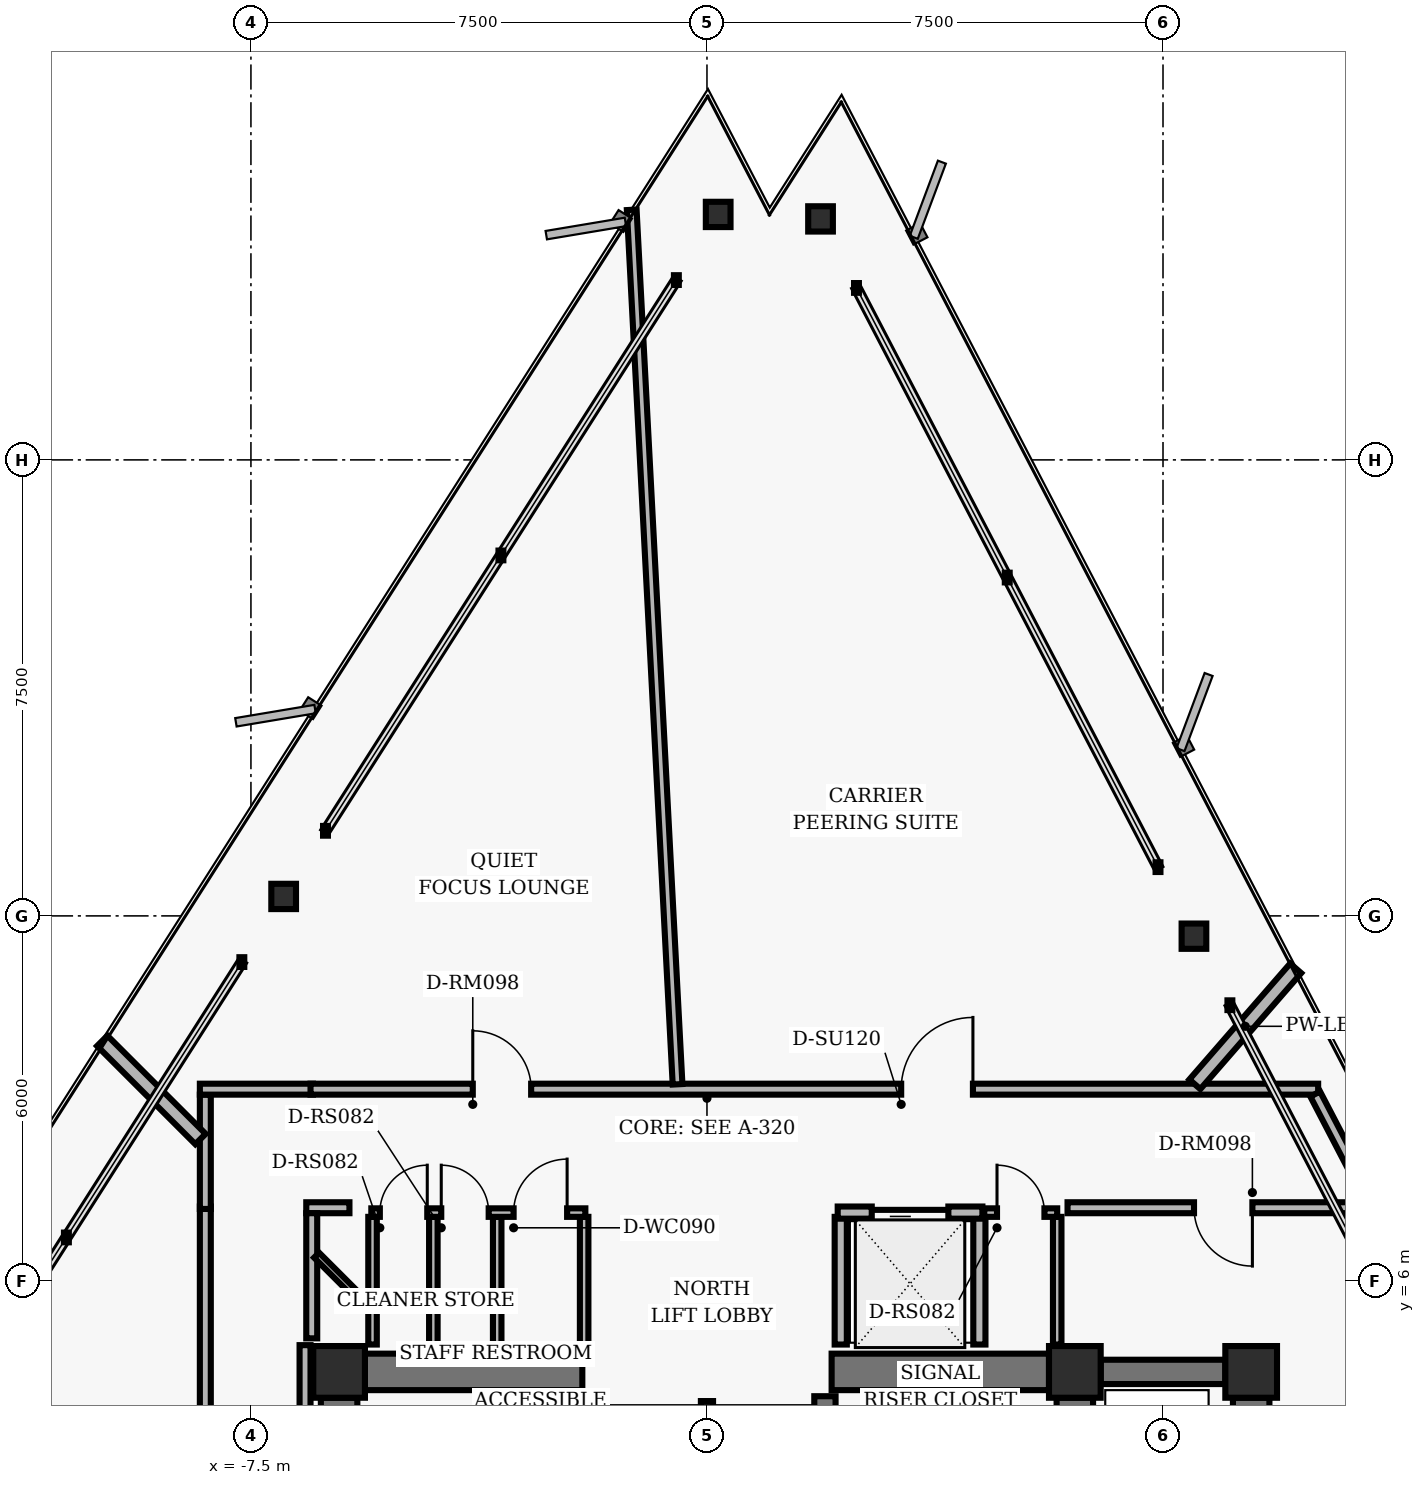
"""IFC4 building model, lengths in metres.
Left out: names, types, materials, properties, quantities, classifications, styles, units other than length and angle.
Written with IfcOpenShell. Run it as: python <this file> out.ifc"""

import sys

from ifc_helpers import new_model, si_unit, direction, frame, frame_2d, origin, origin_2d, place, context, subcontext, project, spatial, rectangle, hollow_rectangle, i_section, extrude, element, fill, save


model = new_model("IFC4")
c1 = context("Model", 3, precision=1e-05, world=origin(), true_north=direction((0.0, 1.0)))
c2 = subcontext(c1, "Body", "Model", "MODEL_VIEW")
j1 = project(units=[si_unit("LENGTHUNIT", "METRE"), si_unit("PLANEANGLEUNIT", "RADIAN")], contexts=[c1])
p1 = place(None, origin())
s1 = spatial("IfcSite", under=j1, at=p1, CompositionType="ELEMENT")
p2 = place(p1, origin())
s2 = spatial("IfcBuilding", under=s1, at=p2, CompositionType="ELEMENT")
p3 = place(p2, frame((0.0, 0.0, 128.96)))
s3 = spatial("IfcBuildingStorey", under=s2, at=p3, CompositionType="ELEMENT", Elevation=128.96)
for number, where, z_axis, x_axis in (
    (1, (-6.05, 4.5, 0.0), (0.0, 0.0, 1.0), (1.0, 0.0, 0.0)),
    (2, (6.05, 4.5, 0.0), (0.0, 0.0, 1.0), (1.0, 0.0, 0.0)),
    (3, (8.95, 4.5, 0.0), (0.0, 0.0, 1.0), (1.0, 0.0, 0.0)),
):
    element("IfcColumn", number, at=place(p3, frame(where, z_axis=z_axis, x_axis=x_axis)), inside=s3, PredefinedType="COLUMN", context=c2, shape_type="SweptSolid", body=[
        extrude(hollow_rectangle(XDim=0.85, YDim=0.85, WallThickness=0.055, InnerFilletRadius=0.02, OuterFilletRadius=0.04, at=origin_2d()), origin(), (0.0, 0.0, 1.0), 3.04),
    ])
for number, where, z_axis, x_axis in (
    (4, (-6.05, 0.425, 0.0), (0.0, 0.0, 1.0), (0.0, 1.0, 0.0)),
    (5, (6.05, 0.425, 0.0), (0.0, 0.0, 1.0), (0.0, 1.0, 0.0)),
):
    element("IfcWall", number, at=place(p3, frame(where, z_axis=z_axis, x_axis=x_axis)), inside=s3, PredefinedType="SHEAR", context=c2, shape_type="SweptSolid", body=[
        extrude(rectangle(XDim=3.65, YDim=0.6, at=frame_2d((1.825, 0.0))), origin(), (0.0, 0.0, 1.0), 2.788),
    ])
for number, where, z_axis, x_axis in (
    (6, (-1.94, -4.1, 0.0), (0.0, 0.0, 1.0), (0.0, 1.0, 0.0)),
    (7, (1.94, -4.1, 0.0), (0.0, 0.0, 1.0), (0.0, 1.0, 0.0)),
):
    element("IfcWall", number, at=place(p3, frame(where, z_axis=z_axis, x_axis=x_axis)), inside=s3, PredefinedType="SHEAR", context=c2, shape_type="SweptSolid", body=[
        extrude(rectangle(XDim=8.2, YDim=0.35, at=frame_2d((4.1, 0.0))), origin(), (0.0, 0.0, 1.0), 2.788),
    ])
for number, where, z_axis, x_axis in (
    (8, (-5.625, 4.5, 0.0), (0.0, 0.0, 1.0), (1.0, 0.0, 0.0)),
    (9, (2.05, 4.5, 0.0), (0.0, 0.0, 1.0), (1.0, 0.0, 0.0)),
):
    element("IfcWall", number, at=place(p3, frame(where, z_axis=z_axis, x_axis=x_axis)), inside=s3, PredefinedType="SHEAR", context=c2, shape_type="SweptSolid", body=[
        extrude(rectangle(XDim=3.575, YDim=0.6, at=frame_2d((1.788, 0.0))), origin(), (0.0, 0.0, 1.0), 2.788),
    ])
p4 = place(p3, frame((8.95, -3.875, 0.0), z_axis=(0.0, 0.0, 1.0), x_axis=(0.0, 1.0, 0.0)))
e10 = element("IfcWall", 10, at=p4, inside=s3, PredefinedType="SHEAR", context=c2, shape_type="SweptSolid", body=[
    extrude(rectangle(XDim=7.95, YDim=0.6, at=frame_2d((3.975, 0.0))), origin(), (0.0, 0.0, 1.0), 2.788),
])
p5 = place(p4, frame((0.55, 0.0, 0.0)))
e11 = element("IfcOpeningElement", 11, at=p5, cuts=e10, PredefinedType="OPENING", context=c2, shape_type="SweptSolid", body=[
    extrude(rectangle(XDim=1.06, YDim=2.04, at=frame_2d((0.53, 1.02))), frame((0.0, 0.31, 0.0), z_axis=(0.0, -1.0, 0.0), x_axis=(1.0, 0.0, 0.0)), (0.0, 0.0, 1.0), 0.62),
])
p6 = place(p4, frame((3.445, 0.0, 0.0)))
e12 = element("IfcOpeningElement", 12, at=p6, cuts=e10, PredefinedType="OPENING", context=c2, shape_type="SweptSolid", body=[
    extrude(rectangle(XDim=1.06, YDim=2.04, at=frame_2d((0.53, 1.02))), frame((0.0, 0.31, 0.0), z_axis=(0.0, -1.0, 0.0), x_axis=(1.0, 0.0, 0.0)), (0.0, 0.0, 1.0), 0.62),
])
p7 = place(p4, frame((6.33, 0.0, 0.0)))
e13 = element("IfcOpeningElement", 13, at=p7, cuts=e10, PredefinedType="OPENING", context=c2, shape_type="SweptSolid", body=[
    extrude(rectangle(XDim=1.06, YDim=2.04, at=frame_2d((0.53, 1.02))), frame((0.0, 0.31, 0.0), z_axis=(0.0, -1.0, 0.0), x_axis=(1.0, 0.0, 0.0)), (0.0, 0.0, 1.0), 0.62),
])
p8 = place(p3, frame((6.475, 4.5, 0.0), z_axis=(0.0, 0.0, 1.0), x_axis=(1.0, 0.0, 0.0)))
e14 = element("IfcWall", 14, at=p8, inside=s3, PredefinedType="SHEAR", context=c2, shape_type="SweptSolid", body=[
    extrude(rectangle(XDim=2.05, YDim=0.4, at=frame_2d((1.025, 0.0))), origin(), (0.0, 0.0, 1.0), 2.788),
])
for number, where, z_axis, x_axis in (
    (15, (8.009, 11.666, 0.0), (0.0, 0.0, 1.0), (1.0, 0.0, 0.0)),
    (16, (1.868, 23.463, 0.0), (0.0, 0.0, 1.0), (1.0, 0.0, 0.0)),
    (17, (0.184, 23.537, 0.0), (0.0, 0.0, 1.0), (1.0, 0.0, 0.0)),
    (18, (-6.962, 12.32, 0.0), (0.0, 0.0, 1.0), (1.0, 0.0, 0.0)),
):
    element("IfcColumn", number, at=place(p3, frame(where, z_axis=z_axis, x_axis=x_axis)), inside=s3, PredefinedType="COLUMN", context=c2, shape_type="SweptSolid", body=[
        extrude(i_section(OverallWidth=0.406, OverallDepth=0.416, WebThickness=0.03, FlangeThickness=0.048, FilletRadius=0.02, at=origin_2d()), origin(), (0.0, 0.0, 1.0), 3.04),
    ])
p9 = place(p3, frame((0.0, 1.25, 0.0), z_axis=(0.0, 0.0, 1.0), x_axis=(0.0, 1.0, 0.0)))
e19 = element("IfcWall", 19, at=p9, inside=s3, PredefinedType="PARTITIONING", context=c2, shape_type="SweptSolid", body=[
    extrude(rectangle(XDim=2.77, YDim=0.2, at=frame_2d((1.385, 0.0))), origin(), (0.0, 0.0, 1.0), 2.763),
])
for number, where, z_axis, x_axis in (
    (20, (2.2, 4.95, 0.0), (0.0, 0.0, 1.0), (0.0, 1.0, 0.0)),
    (21, (4.48, 4.95, 0.0), (0.0, 0.0, 1.0), (0.0, 1.0, 0.0)),
):
    element("IfcWall", number, at=place(p3, frame(where, z_axis=z_axis, x_axis=x_axis)), inside=s3, PredefinedType="PARTITIONING", context=c2, shape_type="SweptSolid", body=[
        extrude(rectangle(XDim=2.1, YDim=0.2, at=frame_2d((1.05, 0.0))), origin(), (0.0, 0.0, 1.0), 2.763),
    ])
p10 = place(p3, frame((2.15, 7.12, 0.0), z_axis=(0.0, 0.0, 1.0), x_axis=(1.0, 0.0, 0.0)))
e22 = element("IfcWall", 22, at=p10, inside=s3, PredefinedType="PARTITIONING", context=c2, shape_type="SweptSolid", body=[
    extrude(rectangle(XDim=2.38, YDim=0.2, at=frame_2d((1.19, 0.0))), origin(), (0.0, 0.0, 1.0), 2.763),
])
p11 = place(p10, frame((0.56, 0.0, 0.0)))
e23 = element("IfcOpeningElement", 23, at=p11, cuts=e22, PredefinedType="OPENING", context=c2, shape_type="SweptSolid", body=[
    extrude(rectangle(XDim=1.26, YDim=2.06, at=frame_2d((0.63, 1.03))), frame((0.0, 0.11, 0.0), z_axis=(0.0, -1.0, 0.0), x_axis=(1.0, 0.0, 0.0)), (0.0, 0.0, 1.0), 0.22),
])
for number, where, z_axis, x_axis in (
    (24, (-5.5, 4.95, 0.0), (0.0, 0.0, 1.0), (0.0, 1.0, 0.0)),
    (25, (-4.5, 4.95, 0.0), (0.0, 0.0, 1.0), (0.0, 1.0, 0.0)),
    (26, (-3.45, 4.95, 0.0), (0.0, 0.0, 1.0), (0.0, 1.0, 0.0)),
    (27, (-2.02, 4.95, 0.0), (0.0, 0.0, 1.0), (0.0, 1.0, 0.0)),
):
    element("IfcWall", number, at=place(p3, frame(where, z_axis=z_axis, x_axis=x_axis)), inside=s3, PredefinedType="PARTITIONING", context=c2, shape_type="SweptSolid", body=[
        extrude(rectangle(XDim=2.1, YDim=0.14, at=frame_2d((1.05, 0.0))), origin(), (0.0, 0.0, 1.0), 2.763),
    ])
p12 = place(p3, frame((-5.52, 7.12, 0.0), z_axis=(0.0, 0.0, 1.0), x_axis=(1.0, 0.0, 0.0)))
e28 = element("IfcWall", 28, at=p12, inside=s3, PredefinedType="PARTITIONING", context=c2, shape_type="SweptSolid", body=[
    extrude(rectangle(XDim=3.52, YDim=0.14, at=frame_2d((1.76, 0.0))), origin(), (0.0, 0.0, 1.0), 2.33),
])
p13 = place(p12, frame((0.14, 0.0, 0.0)))
e29 = element("IfcOpeningElement", 29, at=p13, cuts=e28, PredefinedType="OPENING", context=c2, shape_type="SweptSolid", body=[
    extrude(rectangle(XDim=0.78, YDim=2.01, at=frame_2d((0.39, 1.005))), frame((0.0, 0.08, 0.0), z_axis=(0.0, -1.0, 0.0), x_axis=(1.0, 0.0, 0.0)), (0.0, 0.0, 1.0), 0.16),
])
p14 = place(p12, frame((1.15, 0.0, 0.0)))
e30 = element("IfcOpeningElement", 30, at=p14, cuts=e28, PredefinedType="OPENING", context=c2, shape_type="SweptSolid", body=[
    extrude(rectangle(XDim=0.78, YDim=2.01, at=frame_2d((0.39, 1.005))), frame((0.0, 0.08, 0.0), z_axis=(0.0, -1.0, 0.0), x_axis=(1.0, 0.0, 0.0)), (0.0, 0.0, 1.0), 0.16),
])
p15 = place(p12, frame((2.34, 0.0, 0.0)))
e31 = element("IfcOpeningElement", 31, at=p15, cuts=e28, PredefinedType="OPENING", context=c2, shape_type="SweptSolid", body=[
    extrude(rectangle(XDim=0.88, YDim=2.02, at=frame_2d((0.44, 1.01))), frame((0.0, 0.08, 0.0), z_axis=(0.0, -1.0, 0.0), x_axis=(1.0, 0.0, 0.0)), (0.0, 0.0, 1.0), 0.16),
])
p16 = place(p3, frame((5.76, 4.95, 0.0), z_axis=(0.0, 0.0, 1.0), x_axis=(0.0, 1.0, 0.0)))
e32 = element("IfcWall", 32, at=p16, inside=s3, PredefinedType="PARTITIONING", context=c2, shape_type="SweptSolid", body=[
    extrude(rectangle(XDim=2.1, YDim=0.14, at=frame_2d((1.05, 0.0))), origin(), (0.0, 0.0, 1.0), 2.763),
])
p17 = place(p3, frame((4.56, 7.12, 0.0), z_axis=(0.0, 0.0, 1.0), x_axis=(1.0, 0.0, 0.0)))
e33 = element("IfcWall", 33, at=p17, inside=s3, PredefinedType="PARTITIONING", context=c2, shape_type="SweptSolid", body=[
    extrude(rectangle(XDim=1.2, YDim=0.14, at=frame_2d((0.6, 0.0))), origin(), (0.0, 0.0, 1.0), 2.763),
])
p18 = place(p17, frame((0.21, 0.0, 0.0)))
e34 = element("IfcOpeningElement", 34, at=p18, cuts=e33, PredefinedType="OPENING", context=c2, shape_type="SweptSolid", body=[
    extrude(rectangle(XDim=0.78, YDim=2.01, at=frame_2d((0.39, 1.005))), frame((0.0, 0.08, 0.0), z_axis=(0.0, -1.0, 0.0), x_axis=(1.0, 0.0, 0.0)), (0.0, 0.0, 1.0), 0.16),
])
p19 = place(p3, frame((-8.25, -7.22, 0.0), z_axis=(0.0, 0.0, 1.0), x_axis=(0.0, 1.0, 0.0)))
e35 = element("IfcWall", 35, at=p19, inside=s3, PredefinedType="PARTITIONING", context=c2, shape_type="SweptSolid", body=[
    extrude(rectangle(XDim=14.44, YDim=0.18, at=frame_2d((7.22, 0.0))), origin(), (0.0, 0.0, 1.0), 2.763),
])
p20 = place(p19, frame((2.932, 0.0, 0.0)))
e36 = element("IfcOpeningElement", 36, at=p20, cuts=e35, PredefinedType="OPENING", context=c2, shape_type="SweptSolid", body=[
    extrude(rectangle(XDim=1.18, YDim=2.02, at=frame_2d((0.59, 1.01))), frame((0.0, 0.1, 0.0), z_axis=(0.0, -1.0, 0.0), x_axis=(1.0, 0.0, 0.0)), (0.0, 0.0, 1.0), 0.2),
])
p21 = place(p19, frame((9.892, 0.0, 0.0)))
e37 = element("IfcOpeningElement", 37, at=p21, cuts=e35, PredefinedType="OPENING", context=c2, shape_type="SweptSolid", body=[
    extrude(rectangle(XDim=1.18, YDim=2.02, at=frame_2d((0.59, 1.01))), frame((0.0, 0.1, 0.0), z_axis=(0.0, -1.0, 0.0), x_axis=(1.0, 0.0, 0.0)), (0.0, 0.0, 1.0), 0.2),
])
p22 = place(p3, frame((-8.25, 7.18, 0.0), z_axis=(0.0, 0.0, 1.0), x_axis=(0.0, 1.0, 0.0)))
e38 = element("IfcWall", 38, at=p22, inside=s3, PredefinedType="PARTITIONING", context=c2, shape_type="SweptSolid", body=[
    extrude(rectangle(XDim=1.88, YDim=0.18, at=frame_2d((0.94, 0.0))), origin(), (0.0, 0.0, 1.0), 2.763),
])
p23 = place(p3, frame((-8.34, 9.15, 0.0), z_axis=(0.0, 0.0, 1.0), x_axis=(1.0, 0.0, 0.0)))
e39 = element("IfcWall", 39, at=p23, inside=s3, PredefinedType="PARTITIONING", context=c2, shape_type="SweptSolid", body=[
    extrude(rectangle(XDim=1.86, YDim=0.18, at=frame_2d((0.93, 0.0))), origin(), (0.0, 0.0, 1.0), 2.763),
])
p24 = place(p3, frame((-6.52, 9.15, 0.0), z_axis=(0.0, 0.0, 1.0), x_axis=(1.0, 0.0, 0.0)))
e40 = element("IfcWall", 40, at=p24, inside=s3, PredefinedType="PARTITIONING", context=c2, shape_type="SweptSolid", body=[
    extrude(rectangle(XDim=16.572, YDim=0.18, at=frame_2d((8.286, 0.0))), origin(), (0.0, 0.0, 1.0), 2.33),
])
p25 = place(p24, frame((9.714, 0.0, 0.0)))
e41 = element("IfcOpeningElement", 41, at=p25, cuts=e40, PredefinedType="OPENING", context=c2, shape_type="SweptSolid", body=[
    extrude(rectangle(XDim=1.18, YDim=2.02, at=frame_2d((0.59, 1.01))), frame((0.0, 0.1, 0.0), z_axis=(0.0, -1.0, 0.0), x_axis=(1.0, 0.0, 0.0)), (0.0, 0.0, 1.0), 0.2),
])
p26 = place(p24, frame((2.668, 0.0, 0.0)))
e42 = element("IfcOpeningElement", 42, at=p26, cuts=e40, PredefinedType="OPENING", context=c2, shape_type="SweptSolid", body=[
    extrude(rectangle(XDim=0.96, YDim=2.02, at=frame_2d((0.48, 1.01))), frame((0.0, 0.1, 0.0), z_axis=(0.0, -1.0, 0.0), x_axis=(1.0, 0.0, 0.0)), (0.0, 0.0, 1.0), 0.2),
])
p27 = place(p3, frame((10.003, 9.07, 0.0), z_axis=(0.0, 0.0, 1.0), x_axis=(0.461740291408, -0.887015165198, 0.0)))
e43 = element("IfcWall", 43, at=p27, inside=s3, PredefinedType="PARTITIONING", context=c2, shape_type="SweptSolid", body=[
    extrude(rectangle(XDim=9.976, YDim=0.18, at=frame_2d((4.988, 0.0))), origin(), (0.0, 0.0, 1.0), 2.763),
])
p28 = place(p3, frame((11.05, 7.2, 0.0), z_axis=(0.0, 0.0, 1.0), x_axis=(-1.0, 0.0, 0.0)))
e44 = element("IfcWall", 44, at=p28, inside=s3, PredefinedType="PARTITIONING", context=c2, shape_type="SweptSolid", body=[
    extrude(rectangle(XDim=5.12, YDim=0.18, at=frame_2d((2.56, 0.0))), origin(), (0.0, 0.0, 1.0), 2.763),
])
p29 = place(p28, frame((2.08, 0.0, 0.0)))
e45 = element("IfcOpeningElement", 45, at=p29, cuts=e44, PredefinedType="OPENING", context=c2, shape_type="SweptSolid", body=[
    extrude(rectangle(XDim=0.96, YDim=2.02, at=frame_2d((0.48, 1.01))), frame((0.0, 0.1, 0.0), z_axis=(0.0, -1.0, 0.0), x_axis=(1.0, 0.0, 0.0)), (0.0, 0.0, 1.0), 0.2),
])
p30 = place(p3, frame((-5.88, 7.2, 0.0), z_axis=(0.0, 0.0, 1.0), x_axis=(-1.0, 0.0, 0.0)))
e46 = element("IfcWall", 46, at=p30, inside=s3, PredefinedType="PARTITIONING", context=c2, shape_type="SweptSolid", body=[
    extrude(rectangle(XDim=0.71, YDim=0.18, at=frame_2d((0.355, 0.0))), origin(), (0.0, 0.0, 1.0), 2.33),
])
p31 = place(p3, frame((-6.5, 7.11, 0.0), z_axis=(0.0, 0.0, 1.0), x_axis=(0.0, -1.0, 0.0)))
e47 = element("IfcWall", 47, at=p31, inside=s3, PredefinedType="PARTITIONING", context=c2, shape_type="SweptSolid", body=[
    extrude(rectangle(XDim=2.058, YDim=0.18, at=frame_2d((1.029, 0.0))), origin(), (0.0, 0.0, 1.0), 2.132),
])
p32 = place(p3, frame((-6.61, 4.94, 0.0), z_axis=(0.0, 0.0, 1.0), x_axis=(0.0, -1.0, 0.0)))
e48 = element("IfcWall", 48, at=p32, inside=s3, PredefinedType="PARTITIONING", context=c2, shape_type="SweptSolid", body=[
    extrude(rectangle(XDim=9.46, YDim=0.18, at=frame_2d((4.73, 0.0))), origin(), (0.0, 0.0, 1.0), 2.763),
])
p33 = place(p3, frame((8.023, 9.23, 0.0), z_axis=(0.0, 0.0, 1.0), x_axis=(0.656032852837, 0.754732334009, 0.0)))
e49 = element("IfcWall", 49, at=p33, inside=s3, PredefinedType="PARTITIONING", context=c2, shape_type="SweptSolid", body=[
    extrude(rectangle(XDim=2.528, YDim=0.24, at=frame_2d((1.264, 0.0))), origin(), (0.0, 0.0, 1.0), 2.763),
])
p34 = place(p3, frame((-0.484, 9.23, 0.0), z_axis=(0.0, 0.0, 1.0), x_axis=(-0.052344416919, 0.998629091313, 0.0)))
e50 = element("IfcWall", 50, at=p34, inside=s3, PredefinedType="PARTITIONING", context=c2, shape_type="SweptSolid", body=[
    extrude(rectangle(XDim=14.403, YDim=0.16, at=frame_2d((7.201, 0.0))), origin(), (0.0, 0.0, 1.0), 2.763),
])
p35 = place(p3, frame((-5.8, 5.8, 0.0), z_axis=(0.0, 0.0, 1.0), x_axis=(-0.707106781187, 0.707106781187, 0.0)))
e51 = element("IfcWall", 51, at=p35, inside=s3, PredefinedType="MOVABLE", context=c2, shape_type="SweptSolid", body=[
    extrude(rectangle(XDim=0.877, YDim=0.115, at=frame_2d((0.438, 0.0))), origin(), (0.0, 0.0, 1.0), 2.763),
])
p36 = place(p3, frame((-8.33, 8.33, 0.0), z_axis=(0.0, 0.0, 1.0), x_axis=(-0.707106781187, 0.707106781187, 0.0)))
e52 = element("IfcWall", 52, at=p36, inside=s3, PredefinedType="PARTITIONING", context=c2, shape_type="SweptSolid", body=[
    extrude(rectangle(XDim=2.284, YDim=0.24, at=frame_2d((1.142, 0.0))), origin(), (0.0, 0.0, 1.0), 2.763),
])
p37 = place(p11, origin())
e53 = element("IfcDoor", 53, at=p37, inside=s3, OperationType="SLIDING_TO_LEFT", PredefinedType="DOOR", context=c2, shape_type="SweptSolid", body=[
    extrude(rectangle(XDim=1.26, YDim=2.06, at=frame_2d((0.63, 1.03))), frame((0.0, 0.025, 0.0), z_axis=(0.0, -1.0, 0.0), x_axis=(1.0, 0.0, 0.0)), (0.0, 0.0, 1.0), 0.05),
])
fill(e23, e53)
p38 = place(p13, origin())
e54 = element("IfcDoor", 54, at=p38, inside=s3, OperationType="SINGLE_SWING_RIGHT", PredefinedType="DOOR", context=c2, shape_type="SweptSolid", body=[
    extrude(rectangle(XDim=0.78, YDim=2.01, at=frame_2d((0.39, 1.005))), frame((0.0, 0.025, 0.0), z_axis=(0.0, -1.0, 0.0), x_axis=(1.0, 0.0, 0.0)), (0.0, 0.0, 1.0), 0.05),
])
fill(e29, e54)
p39 = place(p14, origin())
e55 = element("IfcDoor", 55, at=p39, inside=s3, OperationType="SINGLE_SWING_LEFT", PredefinedType="DOOR", context=c2, shape_type="SweptSolid", body=[
    extrude(rectangle(XDim=0.78, YDim=2.01, at=frame_2d((0.39, 1.005))), frame((0.0, 0.025, 0.0), z_axis=(0.0, -1.0, 0.0), x_axis=(1.0, 0.0, 0.0)), (0.0, 0.0, 1.0), 0.05),
])
fill(e30, e55)
p40 = place(p15, origin())
e56 = element("IfcDoor", 56, at=p40, inside=s3, OperationType="SINGLE_SWING_RIGHT", PredefinedType="DOOR", context=c2, shape_type="SweptSolid", body=[
    extrude(rectangle(XDim=0.88, YDim=2.02, at=frame_2d((0.44, 1.01))), frame((0.0, 0.025, 0.0), z_axis=(0.0, -1.0, 0.0), x_axis=(1.0, 0.0, 0.0)), (0.0, 0.0, 1.0), 0.05),
])
fill(e31, e56)
p41 = place(p18, origin())
e57 = element("IfcDoor", 57, at=p41, inside=s3, OperationType="SINGLE_SWING_LEFT", PredefinedType="DOOR", context=c2, shape_type="SweptSolid", body=[
    extrude(rectangle(XDim=0.78, YDim=2.01, at=frame_2d((0.39, 1.005))), frame((0.0, 0.025, 0.0), z_axis=(0.0, -1.0, 0.0), x_axis=(1.0, 0.0, 0.0)), (0.0, 0.0, 1.0), 0.05),
])
fill(e34, e57)
p42 = place(p29, origin())
e58 = element("IfcDoor", 58, at=p42, inside=s3, OperationType="SINGLE_SWING_LEFT", PredefinedType="DOOR", context=c2, shape_type="SweptSolid", body=[
    extrude(rectangle(XDim=0.96, YDim=2.02, at=frame_2d((0.48, 1.01))), frame((0.0, 0.025, 0.0), z_axis=(0.0, -1.0, 0.0), x_axis=(1.0, 0.0, 0.0)), (0.0, 0.0, 1.0), 0.05),
])
fill(e45, e58)
p43 = place(p25, origin())
e59 = element("IfcDoor", 59, at=p43, inside=s3, OperationType="SINGLE_SWING_RIGHT", PredefinedType="DOOR", context=c2, shape_type="SweptSolid", body=[
    extrude(rectangle(XDim=1.18, YDim=2.02, at=frame_2d((0.59, 1.01))), frame((0.0, 0.025, 0.0), z_axis=(0.0, -1.0, 0.0), x_axis=(1.0, 0.0, 0.0)), (0.0, 0.0, 1.0), 0.05),
])
fill(e41, e59)
p44 = place(p26, origin())
e60 = element("IfcDoor", 60, at=p44, inside=s3, OperationType="SINGLE_SWING_LEFT", PredefinedType="DOOR", context=c2, shape_type="SweptSolid", body=[
    extrude(rectangle(XDim=0.96, YDim=2.02, at=frame_2d((0.48, 1.01))), frame((0.0, 0.025, 0.0), z_axis=(0.0, -1.0, 0.0), x_axis=(1.0, 0.0, 0.0)), (0.0, 0.0, 1.0), 0.05),
])
fill(e42, e60)
save(model, sys.argv[1])
